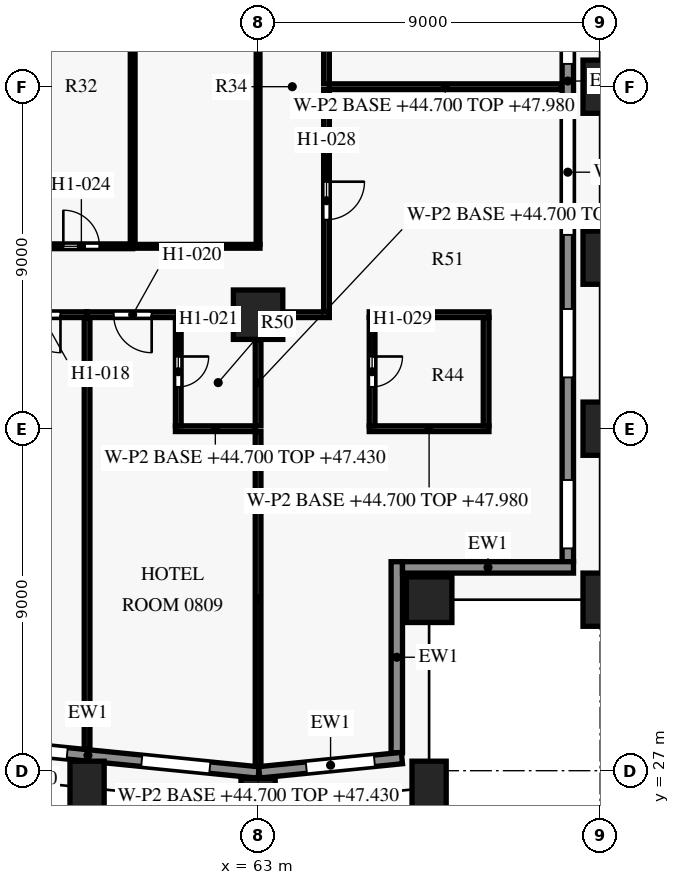
"""IFC4 building model, lengths in metres.
Left out: names, types, materials, properties, quantities, classifications, styles, units other than length and angle.
Written with IfcOpenShell. Run it as: python <this file> out.ifc"""

import sys

from ifc_helpers import new_model, si_unit, direction, frame, frame_2d, origin, origin_2d, place, context, subcontext, project, spatial, rectangle, extrude, element, fill, save


model = new_model("IFC4")
c1 = context("Model", 3, precision=1e-05, world=origin(), true_north=direction((0.0, 1.0)))
c2 = subcontext(c1, "Body", "Model", "MODEL_VIEW")
j1 = project(units=[si_unit("LENGTHUNIT", "METRE"), si_unit("PLANEANGLEUNIT", "RADIAN")], contexts=[c1])
p1 = place(None, origin())
s1 = spatial("IfcSite", under=j1, at=p1, CompositionType="ELEMENT")
p2 = place(p1, origin())
s2 = spatial("IfcBuilding", under=s1, at=p2, CompositionType="ELEMENT")
p3 = place(p2, frame((0.0, 0.0, 44.7)))
s3 = spatial("IfcBuildingStorey", under=s2, at=p3, CompositionType="ELEMENT", Elevation=44.7)
for number, where, z_axis, x_axis in (
    (1, (58.5, 26.55, 0.0), (0.0, 0.0, 1.0), (0.995, -0.1, 0.0)),
    (2, (63.0, 26.1, 0.0), (0.0, 0.0, 1.0), (1.0, 0.0, 0.0)),
    (3, (67.5, 26.55, 0.0), (0.0, 0.0, 1.0), (0.995, 0.1, 0.0)),
    (4, (72.0, 31.5, 0.0), (0.0, 0.0, 1.0), (0.0, 1.0, 0.0)),
    (5, (72.0, 36.0, 0.0), (0.0, 0.0, 1.0), (0.0, 1.0, 0.0)),
    (6, (72.0, 40.5, 0.0), (0.0, 0.0, 1.0), (0.0, 1.0, 0.0)),
    (7, (72.0, 45.0, 0.0), (0.0, 0.0, 1.0), (0.0, 1.0, 0.0)),
):
    element("IfcColumn", number, at=place(p3, frame(where, z_axis=z_axis, x_axis=x_axis)), inside=s3, PredefinedType="COLUMN", context=c2, shape_type="SweptSolid", body=[
        extrude(rectangle(XDim=0.9, YDim=1.4, at=origin_2d()), origin(), (0.0, 0.0, 1.0), 3.6),
    ])
p4 = place(p3, frame((67.5, 31.5, 0.0), z_axis=(0.0, 0.0, 1.0), x_axis=(1.0, 0.0, 0.0)))
e8 = element("IfcColumn", 8, at=p4, inside=s3, PredefinedType="COLUMN", context=c2, shape_type="SweptSolid", body=[
    extrude(rectangle(XDim=1.2, YDim=1.2, at=origin_2d()), origin(), (0.0, 0.0, 1.0), 3.6),
])
p5 = place(p3, frame((63.0, 39.0, 0.0), z_axis=(0.0, 0.0, 1.0), x_axis=(1.0, 0.0, 0.0)))
e9 = element("IfcColumn", 9, at=p5, inside=s3, PredefinedType="COLUMN", context=c2, shape_type="SweptSolid", body=[
    extrude(rectangle(XDim=1.3, YDim=1.3, at=origin_2d()), origin(), (0.0, 0.0, 1.0), 3.6),
])
p6 = place(p3, frame((63.015, 26.953, 0.0), z_axis=(0.0, 0.0, 1.0), x_axis=(-0.995035316196, 0.099522457379, 0.0)))
e10 = element("IfcWall", 10, at=p6, inside=s3, PredefinedType="SOLIDWALL", context=c2, shape_type="SweptSolid", body=[
    extrude(rectangle(XDim=9.03, YDim=0.3, at=frame_2d((4.515, 0.0))), origin(), (0.0, 0.0, 1.0), 2.95),
])
p7 = place(p6, frame((1.291, 0.0, 0.75)))
e11 = element("IfcOpeningElement", 11, at=p7, cuts=e10, PredefinedType="OPENING", context=c2, shape_type="SweptSolid", body=[
    extrude(rectangle(XDim=1.8, YDim=1.8, at=frame_2d((0.9, 0.9))), frame((0.0, 0.16, 0.0), z_axis=(0.0, -1.0, 0.0), x_axis=(1.0, 0.0, 0.0)), (0.0, 0.0, 1.0), 0.32),
])
p8 = place(p6, frame((5.064, 0.0, 0.15)))
e12 = element("IfcOpeningElement", 12, at=p8, cuts=e10, PredefinedType="OPENING", context=c2, shape_type="SweptSolid", body=[
    extrude(rectangle(XDim=3.3, YDim=2.4, at=frame_2d((1.65, 1.2))), frame((0.0, 0.16, 0.0), z_axis=(0.0, -1.0, 0.0), x_axis=(1.0, 0.0, 0.0)), (0.0, 0.0, 1.0), 0.32),
])
p9 = place(p3, frame((66.785, 27.333, 0.0), z_axis=(0.0, 0.0, 1.0), x_axis=(-0.995038471088, -0.099490909409, 0.0)))
e13 = element("IfcWall", 13, at=p9, inside=s3, PredefinedType="SOLIDWALL", context=c2, shape_type="SweptSolid", body=[
    extrude(rectangle(XDim=3.774, YDim=0.3, at=frame_2d((1.887, 0.0))), origin(), (0.0, 0.0, 1.0), 2.95),
])
p10 = place(p9, frame((0.728, 0.0, 0.75)))
e14 = element("IfcOpeningElement", 14, at=p10, cuts=e13, PredefinedType="OPENING", context=c2, shape_type="SweptSolid", body=[
    extrude(rectangle(XDim=1.8, YDim=1.8, at=frame_2d((0.9, 0.9))), frame((0.0, 0.16, 0.0), z_axis=(0.0, -1.0, 0.0), x_axis=(1.0, 0.0, 0.0)), (0.0, 0.0, 1.0), 0.32),
])
p11 = place(p3, frame((66.65, 32.5, 0.0), z_axis=(0.0, 0.0, 1.0), x_axis=(0.0, -1.0, 0.0)))
e15 = element("IfcWall", 15, at=p11, inside=s3, PredefinedType="SOLIDWALL", context=c2, shape_type="SweptSolid", body=[
    extrude(rectangle(XDim=5.029, YDim=0.3, at=frame_2d((2.514, 0.0))), origin(), (0.0, 0.0, 1.0), 2.95),
])
p12 = place(p3, frame((71.3, 32.35, 0.0), z_axis=(0.0, 0.0, 1.0), x_axis=(-1.0, 0.0, 0.0)))
e16 = element("IfcWall", 16, at=p12, inside=s3, PredefinedType="SOLIDWALL", context=c2, shape_type="SweptSolid", body=[
    extrude(rectangle(XDim=4.5, YDim=0.3, at=frame_2d((2.25, 0.0))), origin(), (0.0, 0.0, 1.0), 2.95),
])
p13 = place(p3, frame((71.15, 57.8, 0.0), z_axis=(0.0, 0.0, 1.0), x_axis=(0.0, -1.0, 0.0)))
e17 = element("IfcWall", 17, at=p13, inside=s3, PredefinedType="SOLIDWALL", context=c2, shape_type="SweptSolid", body=[
    extrude(rectangle(XDim=25.302, YDim=0.3, at=frame_2d((12.651, 0.0))), origin(), (0.0, 0.0, 1.0), 2.95),
])
p14 = place(p13, frame((0.65, 0.0, 0.75)))
e18 = element("IfcOpeningElement", 18, at=p14, cuts=e17, PredefinedType="OPENING", context=c2, shape_type="SweptSolid", body=[
    extrude(rectangle(XDim=1.8, YDim=1.8, at=frame_2d((0.9, 0.9))), frame((0.0, 0.16, 0.0), z_axis=(0.0, -1.0, 0.0), x_axis=(1.0, 0.0, 0.0)), (0.0, 0.0, 1.0), 0.32),
])
p15 = place(p13, frame((5.15, 0.0, 0.75)))
e19 = element("IfcOpeningElement", 19, at=p15, cuts=e17, PredefinedType="OPENING", context=c2, shape_type="SweptSolid", body=[
    extrude(rectangle(XDim=1.8, YDim=1.8, at=frame_2d((0.9, 0.9))), frame((0.0, 0.16, 0.0), z_axis=(0.0, -1.0, 0.0), x_axis=(1.0, 0.0, 0.0)), (0.0, 0.0, 1.0), 0.32),
])
p16 = place(p13, frame((8.9, 0.0, 0.15)))
e20 = element("IfcOpeningElement", 20, at=p16, cuts=e17, PredefinedType="OPENING", context=c2, shape_type="SweptSolid", body=[
    extrude(rectangle(XDim=3.3, YDim=2.4, at=frame_2d((1.65, 1.2))), frame((0.0, 0.16, 0.0), z_axis=(0.0, -1.0, 0.0), x_axis=(1.0, 0.0, 0.0)), (0.0, 0.0, 1.0), 0.32),
])
p17 = place(p13, frame((13.4, 0.0, 0.15)))
e21 = element("IfcOpeningElement", 21, at=p17, cuts=e17, PredefinedType="OPENING", context=c2, shape_type="SweptSolid", body=[
    extrude(rectangle(XDim=3.3, YDim=2.4, at=frame_2d((1.65, 1.2))), frame((0.0, 0.16, 0.0), z_axis=(0.0, -1.0, 0.0), x_axis=(1.0, 0.0, 0.0)), (0.0, 0.0, 1.0), 0.32),
])
p18 = place(p13, frame((18.65, 0.0, 0.75)))
e22 = element("IfcOpeningElement", 22, at=p18, cuts=e17, PredefinedType="OPENING", context=c2, shape_type="SweptSolid", body=[
    extrude(rectangle(XDim=1.8, YDim=1.8, at=frame_2d((0.9, 0.9))), frame((0.0, 0.16, 0.0), z_axis=(0.0, -1.0, 0.0), x_axis=(1.0, 0.0, 0.0)), (0.0, 0.0, 1.0), 0.32),
])
p19 = place(p13, frame((23.15, 0.0, 0.75)))
e23 = element("IfcOpeningElement", 23, at=p19, cuts=e17, PredefinedType="OPENING", context=c2, shape_type="SweptSolid", body=[
    extrude(rectangle(XDim=1.8, YDim=1.8, at=frame_2d((0.9, 0.9))), frame((0.0, 0.16, 0.0), z_axis=(0.0, -1.0, 0.0), x_axis=(1.0, 0.0, 0.0)), (0.0, 0.0, 1.0), 0.32),
])
p20 = place(p3, frame((63.0, 35.925, 0.0), z_axis=(0.0, 0.0, 1.0), x_axis=(0.0, -1.0, 0.0)))
e24 = element("IfcWall", 24, at=p20, inside=s3, PredefinedType="PARTITIONING", context=c2, shape_type="SweptSolid", body=[
    extrude(rectangle(XDim=8.8, YDim=0.15, at=frame_2d((4.4, 0.0))), origin(), (0.0, 0.0, 1.0), 2.73),
])
p21 = place(p3, frame((60.825, 36.0, 0.0), z_axis=(0.0, 0.0, 1.0), x_axis=(1.0, 0.0, 0.0)))
e25 = element("IfcWall", 25, at=p21, inside=s3, PredefinedType="PARTITIONING", context=c2, shape_type="SweptSolid", body=[
    extrude(rectangle(XDim=2.1, YDim=0.15, at=frame_2d((1.05, 0.0))), origin(), (0.0, 0.0, 1.0), 2.73),
])
p22 = place(p3, frame((65.925, 36.0, 0.0), z_axis=(0.0, 0.0, 1.0), x_axis=(1.0, 0.0, 0.0)))
e26 = element("IfcWall", 26, at=p22, inside=s3, PredefinedType="PARTITIONING", context=c2, shape_type="SweptSolid", body=[
    extrude(rectangle(XDim=3.15, YDim=0.15, at=frame_2d((1.575, 0.0))), origin(), (0.0, 0.0, 1.0), 3.28),
])
p23 = place(p3, frame((69.0, 36.075, 0.0), z_axis=(0.0, 0.0, 1.0), x_axis=(0.0, 1.0, 0.0)))
e27 = element("IfcWall", 27, at=p23, inside=s3, PredefinedType="PARTITIONING", context=c2, shape_type="SweptSolid", body=[
    extrude(rectangle(XDim=2.85, YDim=0.15, at=frame_2d((1.425, 0.0))), origin(), (0.0, 0.0, 1.0), 2.58),
])
p24 = place(p3, frame((63.0, 38.345, 0.0), z_axis=(0.0, 0.0, 1.0), x_axis=(0.0, -1.0, 0.0)))
e28 = element("IfcWall", 28, at=p24, inside=s3, PredefinedType="PARTITIONING", context=c2, shape_type="SweptSolid", body=[
    extrude(rectangle(XDim=2.27, YDim=0.15, at=frame_2d((1.135, 0.0))), origin(), (0.0, 0.0, 1.0), 2.73),
])
p25 = place(p3, frame((58.5, 38.925, 0.0), z_axis=(0.0, 0.0, 1.0), x_axis=(0.0, -1.0, 0.0)))
e29 = element("IfcWall", 29, at=p25, inside=s3, PredefinedType="PARTITIONING", context=c2, shape_type="SweptSolid", body=[
    extrude(rectangle(XDim=11.35, YDim=0.15, at=frame_2d((5.675, 0.0))), origin(), (0.0, 0.0, 1.0), 2.58),
])
p26 = place(p3, frame((60.9, 38.925, 0.0), z_axis=(0.0, 0.0, 1.0), x_axis=(0.0, -1.0, 0.0)))
e30 = element("IfcWall", 30, at=p26, inside=s3, PredefinedType="PARTITIONING", context=c2, shape_type="SweptSolid", body=[
    extrude(rectangle(XDim=2.85, YDim=0.15, at=frame_2d((1.425, 0.0))), origin(), (0.0, 0.0, 1.0), 2.58),
])
p27 = place(p26, frame((1.025, 0.0, 0.0)))
e31 = element("IfcOpeningElement", 31, at=p27, cuts=e30, PredefinedType="OPENING", context=c2, shape_type="SweptSolid", body=[
    extrude(rectangle(XDim=0.8, YDim=2.1, at=frame_2d((0.4, 1.05))), frame((0.0, 0.085, 0.0), z_axis=(0.0, -1.0, 0.0), x_axis=(1.0, 0.0, 0.0)), (0.0, 0.0, 1.0), 0.17),
])
p28 = place(p3, frame((66.0, 38.925, 0.0), z_axis=(0.0, 0.0, 1.0), x_axis=(0.0, -1.0, 0.0)))
e32 = element("IfcWall", 32, at=p28, inside=s3, PredefinedType="PARTITIONING", context=c2, shape_type="SweptSolid", body=[
    extrude(rectangle(XDim=2.85, YDim=0.15, at=frame_2d((1.425, 0.0))), origin(), (0.0, 0.0, 1.0), 2.58),
])
p29 = place(p28, frame((1.025, 0.0, 0.0)))
e33 = element("IfcOpeningElement", 33, at=p29, cuts=e32, PredefinedType="OPENING", context=c2, shape_type="SweptSolid", body=[
    extrude(rectangle(XDim=0.8, YDim=2.1, at=frame_2d((0.4, 1.05))), frame((0.0, 0.085, 0.0), z_axis=(0.0, -1.0, 0.0), x_axis=(1.0, 0.0, 0.0)), (0.0, 0.0, 1.0), 0.17),
])
p30 = place(p3, frame((58.5, 39.0, 0.0), z_axis=(0.0, 0.0, 1.0), x_axis=(-1.0, 0.0, 0.0)))
e34 = element("IfcWall", 34, at=p30, inside=s3, PredefinedType="PARTITIONING", context=c2, shape_type="SweptSolid", body=[
    extrude(rectangle(XDim=2.4, YDim=0.15, at=frame_2d((1.2, 0.0))), origin(), (0.0, 0.0, 1.0), 2.58),
])
p31 = place(p30, frame((0.7, 0.0, 0.0)))
e35 = element("IfcOpeningElement", 35, at=p31, cuts=e34, PredefinedType="OPENING", context=c2, shape_type="SweptSolid", body=[
    extrude(rectangle(XDim=1.0, YDim=2.1, at=frame_2d((0.5, 1.05))), frame((0.0, 0.085, 0.0), z_axis=(0.0, -1.0, 0.0), x_axis=(1.0, 0.0, 0.0)), (0.0, 0.0, 1.0), 0.17),
])
p32 = place(p3, frame((60.9, 39.0, 0.0), z_axis=(0.0, 0.0, 1.0), x_axis=(-1.0, 0.0, 0.0)))
e36 = element("IfcWall", 36, at=p32, inside=s3, PredefinedType="PARTITIONING", context=c2, shape_type="SweptSolid", body=[
    extrude(rectangle(XDim=2.4, YDim=0.15, at=frame_2d((1.2, 0.0))), origin(), (0.0, 0.0, 1.0), 2.58),
])
p33 = place(p32, frame((0.7, 0.0, 0.0)))
e37 = element("IfcOpeningElement", 37, at=p33, cuts=e36, PredefinedType="OPENING", context=c2, shape_type="SweptSolid", body=[
    extrude(rectangle(XDim=1.0, YDim=2.1, at=frame_2d((0.5, 1.05))), frame((0.0, 0.085, 0.0), z_axis=(0.0, -1.0, 0.0), x_axis=(1.0, 0.0, 0.0)), (0.0, 0.0, 1.0), 0.17),
])
p34 = place(p3, frame((62.345, 39.0, 0.0), z_axis=(0.0, 0.0, 1.0), x_axis=(-1.0, 0.0, 0.0)))
e38 = element("IfcWall", 38, at=p34, inside=s3, PredefinedType="PARTITIONING", context=c2, shape_type="SweptSolid", body=[
    extrude(rectangle(XDim=1.445, YDim=0.15, at=frame_2d((0.723, 0.0))), origin(), (0.0, 0.0, 1.0), 2.58),
])
p35 = place(p3, frame((64.875, 39.0, 0.0), z_axis=(0.0, 0.0, 1.0), x_axis=(-1.0, 0.0, 0.0)))
e39 = element("IfcWall", 39, at=p35, inside=s3, PredefinedType="PARTITIONING", context=c2, shape_type="SweptSolid", body=[
    extrude(rectangle(XDim=1.22, YDim=0.15, at=frame_2d((0.61, 0.0))), origin(), (0.0, 0.0, 1.0), 2.58),
])
p36 = place(p3, frame((69.075, 39.0, 0.0), z_axis=(0.0, 0.0, 1.0), x_axis=(-1.0, 0.0, 0.0)))
e40 = element("IfcWall", 40, at=p36, inside=s3, PredefinedType="PARTITIONING", context=c2, shape_type="SweptSolid", body=[
    extrude(rectangle(XDim=3.15, YDim=0.15, at=frame_2d((1.575, 0.0))), origin(), (0.0, 0.0, 1.0), 2.58),
])
p37 = place(p3, frame((57.0, 40.8, 0.0), z_axis=(0.0, 0.0, 1.0), x_axis=(1.0, 0.0, 0.0)))
e41 = element("IfcWall", 41, at=p37, inside=s3, PredefinedType="PARTITIONING", context=c2, shape_type="SweptSolid", body=[
    extrude(rectangle(XDim=2.7, YDim=0.125, at=frame_2d((1.35, 0.0))), origin(), (0.0, 0.0, 1.0), 3.28),
])
p38 = place(p37, frame((0.875, 0.0, 0.0)))
e42 = element("IfcOpeningElement", 42, at=p38, cuts=e41, PredefinedType="OPENING", context=c2, shape_type="SweptSolid", body=[
    extrude(rectangle(XDim=0.95, YDim=2.1, at=frame_2d((0.475, 1.05))), frame((0.0, 0.073, 0.0), z_axis=(0.0, -1.0, 0.0), x_axis=(1.0, 0.0, 0.0)), (0.0, 0.0, 1.0), 0.145),
])
p39 = place(p3, frame((59.7, 40.8, 0.0), z_axis=(0.0, 0.0, 1.0), x_axis=(1.0, 0.0, 0.0)))
e43 = element("IfcWall", 43, at=p39, inside=s3, PredefinedType="PARTITIONING", context=c2, shape_type="SweptSolid", body=[
    extrude(rectangle(XDim=3.35, YDim=0.1, at=frame_2d((1.675, 0.0))), origin(), (0.0, 0.0, 1.0), 2.73),
])
p40 = place(p3, frame((63.0, 40.85, 0.0), z_axis=(0.0, 0.0, 1.0), x_axis=(0.0, 1.0, 0.0)))
e44 = element("IfcWall", 44, at=p40, inside=s3, PredefinedType="PARTITIONING", context=c2, shape_type="SweptSolid", body=[
    extrude(rectangle(XDim=8.3, YDim=0.1, at=frame_2d((4.15, 0.0))), origin(), (0.0, 0.0, 1.0), 2.73),
])
p41 = place(p3, frame((64.8, 44.925, 0.0), z_axis=(0.0, 0.0, 1.0), x_axis=(0.0, -1.0, 0.0)))
e45 = element("IfcWall", 45, at=p41, inside=s3, PredefinedType="PARTITIONING", context=c2, shape_type="SweptSolid", body=[
    extrude(rectangle(XDim=5.85, YDim=0.15, at=frame_2d((2.925, 0.0))), origin(), (0.0, 0.0, 1.0), 2.58),
])
p42 = place(p41, frame((2.425, 0.0, 0.0)))
e46 = element("IfcOpeningElement", 46, at=p42, cuts=e45, PredefinedType="OPENING", context=c2, shape_type="SweptSolid", body=[
    extrude(rectangle(XDim=1.0, YDim=2.1, at=frame_2d((0.5, 1.05))), frame((0.0, 0.085, 0.0), z_axis=(0.0, -1.0, 0.0), x_axis=(1.0, 0.0, 0.0)), (0.0, 0.0, 1.0), 0.17),
])
p43 = place(p3, frame((70.98, 45.0, 0.0), z_axis=(0.0, 0.0, 1.0), x_axis=(-1.0, 0.0, 0.0)))
e47 = element("IfcWall", 47, at=p43, inside=s3, PredefinedType="PARTITIONING", context=c2, shape_type="SweptSolid", body=[
    extrude(rectangle(XDim=6.105, YDim=0.15, at=frame_2d((3.052, 0.0))), origin(), (0.0, 0.0, 1.0), 3.28),
])
p44 = place(p3, frame((59.7, 49.137, 0.0), z_axis=(0.0, 0.0, 1.0), x_axis=(0.0, -1.0, 0.0)))
e48 = element("IfcWall", 48, at=p44, inside=s3, PredefinedType="PARTITIONING", context=c2, shape_type="SweptSolid", body=[
    extrude(rectangle(XDim=8.275, YDim=0.125, at=frame_2d((4.137, 0.0))), origin(), (0.0, 0.0, 1.0), 3.28),
])
p45 = place(p3, frame((64.8, 50.925, 0.0), z_axis=(0.0, 0.0, 1.0), x_axis=(0.0, -1.0, 0.0)))
e49 = element("IfcWall", 49, at=p45, inside=s3, PredefinedType="PARTITIONING", context=c2, shape_type="SweptSolid", body=[
    extrude(rectangle(XDim=5.85, YDim=0.15, at=frame_2d((2.925, 0.0))), origin(), (0.0, 0.0, 1.0), 2.58),
])
p46 = place(p45, frame((2.425, 0.0, 0.0)))
e50 = element("IfcOpeningElement", 50, at=p46, cuts=e49, PredefinedType="OPENING", context=c2, shape_type="SweptSolid", body=[
    extrude(rectangle(XDim=1.0, YDim=2.1, at=frame_2d((0.5, 1.05))), frame((0.0, 0.085, 0.0), z_axis=(0.0, -1.0, 0.0), x_axis=(1.0, 0.0, 0.0)), (0.0, 0.0, 1.0), 0.17),
])
p47 = place(p7, origin())
e51 = element("IfcWindow", 51, at=p47, inside=s3, PartitioningType="SINGLE_PANEL", PredefinedType="WINDOW", context=c2, shape_type="SweptSolid", body=[
    extrude(rectangle(XDim=1.8, YDim=1.8, at=frame_2d((0.9, 0.9))), frame((0.0, 0.03, 0.0), z_axis=(0.0, -1.0, 0.0), x_axis=(1.0, 0.0, 0.0)), (0.0, 0.0, 1.0), 0.06),
])
fill(e11, e51)
p48 = place(p8, origin())
e52 = element("IfcWindow", 52, at=p48, inside=s3, PartitioningType="SINGLE_PANEL", PredefinedType="WINDOW", context=c2, shape_type="SweptSolid", body=[
    extrude(rectangle(XDim=3.3, YDim=2.4, at=frame_2d((1.65, 1.2))), frame((0.0, 0.03, 0.0), z_axis=(0.0, -1.0, 0.0), x_axis=(1.0, 0.0, 0.0)), (0.0, 0.0, 1.0), 0.06),
])
fill(e12, e52)
p49 = place(p10, origin())
e53 = element("IfcWindow", 53, at=p49, inside=s3, PartitioningType="SINGLE_PANEL", PredefinedType="WINDOW", context=c2, shape_type="SweptSolid", body=[
    extrude(rectangle(XDim=1.8, YDim=1.8, at=frame_2d((0.9, 0.9))), frame((0.0, 0.03, 0.0), z_axis=(0.0, -1.0, 0.0), x_axis=(1.0, 0.0, 0.0)), (0.0, 0.0, 1.0), 0.06),
])
fill(e14, e53)
p50 = place(p16, origin())
e54 = element("IfcWindow", 54, at=p50, inside=s3, PartitioningType="SINGLE_PANEL", PredefinedType="WINDOW", context=c2, shape_type="SweptSolid", body=[
    extrude(rectangle(XDim=3.3, YDim=2.4, at=frame_2d((1.65, 1.2))), frame((0.0, 0.03, 0.0), z_axis=(0.0, -1.0, 0.0), x_axis=(1.0, 0.0, 0.0)), (0.0, 0.0, 1.0), 0.06),
])
fill(e20, e54)
p51 = place(p17, origin())
e55 = element("IfcWindow", 55, at=p51, inside=s3, PartitioningType="SINGLE_PANEL", PredefinedType="WINDOW", context=c2, shape_type="SweptSolid", body=[
    extrude(rectangle(XDim=3.3, YDim=2.4, at=frame_2d((1.65, 1.2))), frame((0.0, 0.03, 0.0), z_axis=(0.0, -1.0, 0.0), x_axis=(1.0, 0.0, 0.0)), (0.0, 0.0, 1.0), 0.06),
])
fill(e21, e55)
p52 = place(p18, origin())
e56 = element("IfcWindow", 56, at=p52, inside=s3, PartitioningType="SINGLE_PANEL", PredefinedType="WINDOW", context=c2, shape_type="SweptSolid", body=[
    extrude(rectangle(XDim=1.8, YDim=1.8, at=frame_2d((0.9, 0.9))), frame((0.0, 0.03, 0.0), z_axis=(0.0, -1.0, 0.0), x_axis=(1.0, 0.0, 0.0)), (0.0, 0.0, 1.0), 0.06),
])
fill(e22, e56)
p53 = place(p19, origin())
e57 = element("IfcWindow", 57, at=p53, inside=s3, PartitioningType="SINGLE_PANEL", PredefinedType="WINDOW", context=c2, shape_type="SweptSolid", body=[
    extrude(rectangle(XDim=1.8, YDim=1.8, at=frame_2d((0.9, 0.9))), frame((0.0, 0.03, 0.0), z_axis=(0.0, -1.0, 0.0), x_axis=(1.0, 0.0, 0.0)), (0.0, 0.0, 1.0), 0.06),
])
fill(e23, e57)
p54 = place(p31, origin())
e58 = element("IfcDoor", 58, at=p54, inside=s3, OperationType="SINGLE_SWING_LEFT", PredefinedType="DOOR", context=c2, shape_type="SweptSolid", body=[
    extrude(rectangle(XDim=1.0, YDim=2.1, at=frame_2d((0.5, 1.05))), frame((0.0, 0.025, 0.0), z_axis=(0.0, -1.0, 0.0), x_axis=(1.0, 0.0, 0.0)), (0.0, 0.0, 1.0), 0.05),
])
fill(e35, e58)
p55 = place(p33, origin())
e59 = element("IfcDoor", 59, at=p55, inside=s3, OperationType="SINGLE_SWING_LEFT", PredefinedType="DOOR", context=c2, shape_type="SweptSolid", body=[
    extrude(rectangle(XDim=1.0, YDim=2.1, at=frame_2d((0.5, 1.05))), frame((0.0, 0.025, 0.0), z_axis=(0.0, -1.0, 0.0), x_axis=(1.0, 0.0, 0.0)), (0.0, 0.0, 1.0), 0.05),
])
fill(e37, e59)
p56 = place(p27, origin())
e60 = element("IfcDoor", 60, at=p56, inside=s3, OperationType="SINGLE_SWING_LEFT", PredefinedType="DOOR", context=c2, shape_type="SweptSolid", body=[
    extrude(rectangle(XDim=0.8, YDim=2.1, at=frame_2d((0.4, 1.05))), frame((0.0, 0.025, 0.0), z_axis=(0.0, -1.0, 0.0), x_axis=(1.0, 0.0, 0.0)), (0.0, 0.0, 1.0), 0.05),
])
fill(e31, e60)
p57 = place(p38, origin())
e61 = element("IfcDoor", 61, at=p57, inside=s3, OperationType="SINGLE_SWING_LEFT", PredefinedType="DOOR", context=c2, shape_type="SweptSolid", body=[
    extrude(rectangle(XDim=0.95, YDim=2.1, at=frame_2d((0.475, 1.05))), frame((0.0, 0.025, 0.0), z_axis=(0.0, -1.0, 0.0), x_axis=(1.0, 0.0, 0.0)), (0.0, 0.0, 1.0), 0.05),
])
fill(e42, e61)
p58 = place(p42, origin())
e62 = element("IfcDoor", 62, at=p58, inside=s3, OperationType="SINGLE_SWING_LEFT", PredefinedType="DOOR", context=c2, shape_type="SweptSolid", body=[
    extrude(rectangle(XDim=1.0, YDim=2.1, at=frame_2d((0.5, 1.05))), frame((0.0, 0.025, 0.0), z_axis=(0.0, -1.0, 0.0), x_axis=(1.0, 0.0, 0.0)), (0.0, 0.0, 1.0), 0.05),
])
fill(e46, e62)
p59 = place(p29, origin())
e63 = element("IfcDoor", 63, at=p59, inside=s3, OperationType="SINGLE_SWING_RIGHT", PredefinedType="DOOR", context=c2, shape_type="SweptSolid", body=[
    extrude(rectangle(XDim=0.8, YDim=2.1, at=frame_2d((0.4, 1.05))), frame((0.0, 0.025, 0.0), z_axis=(0.0, -1.0, 0.0), x_axis=(1.0, 0.0, 0.0)), (0.0, 0.0, 1.0), 0.05),
])
fill(e33, e63)
save(model, sys.argv[1])
